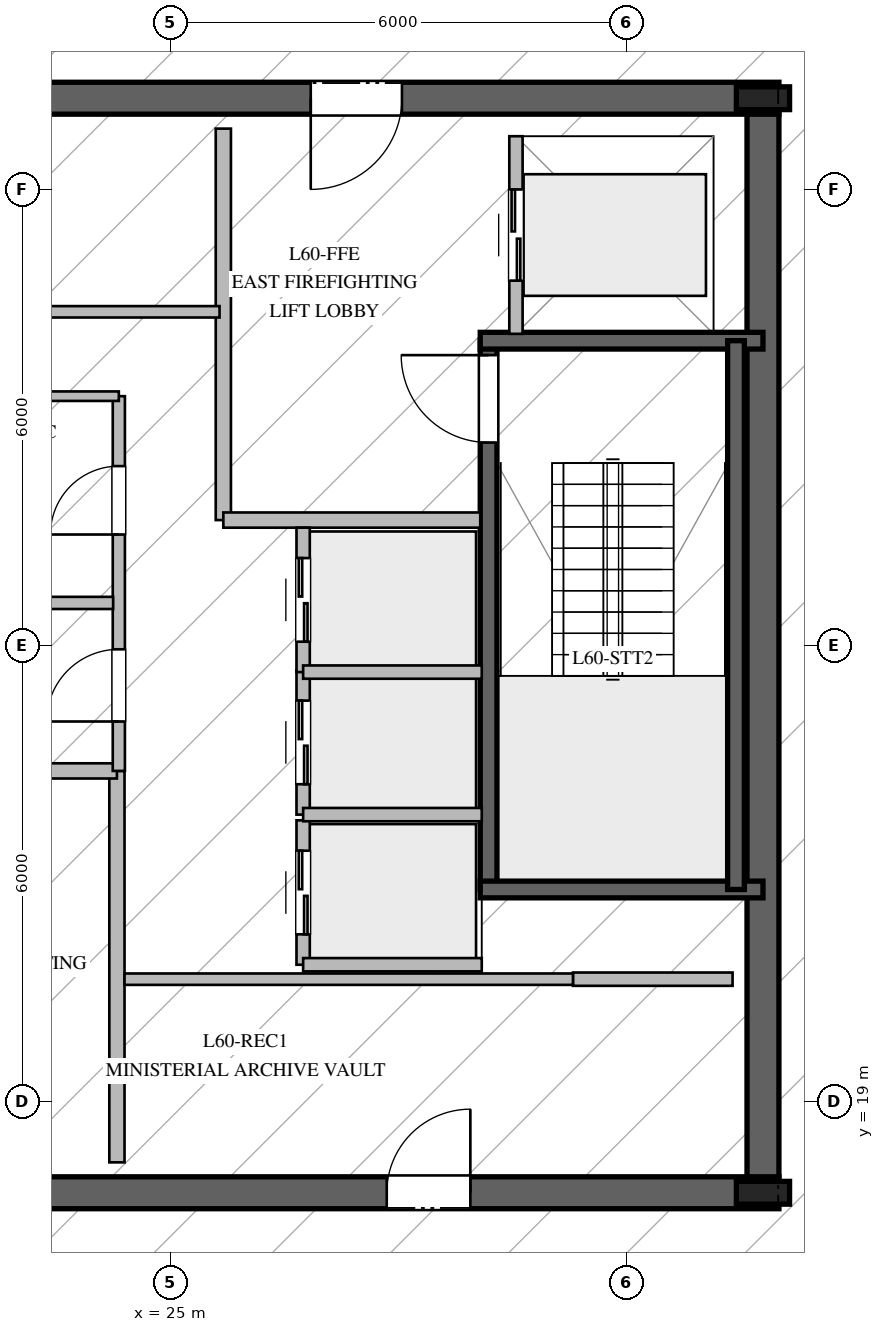
"""IFC4 building model, lengths in metres.
Left out: names, types, materials, properties, quantities, classifications, styles, units other than length and angle.
Written with IfcOpenShell. Run it as: python <this file> out.ifc"""

import sys

from ifc_helpers import new_model, si_unit, direction, frame, frame_2d, origin, origin_2d, place, context, subcontext, project, spatial, rectangle, i_section, extrude, element, fill, save


model = new_model("IFC4")
c1 = context("Model", 3, precision=1e-05, world=origin(), true_north=direction((0.0, 1.0)))
c2 = subcontext(c1, "Body", "Model", "MODEL_VIEW")
j1 = project(units=[si_unit("LENGTHUNIT", "METRE"), si_unit("PLANEANGLEUNIT", "RADIAN")], contexts=[c1])
p1 = place(None, origin())
s1 = spatial("IfcSite", under=j1, at=p1, CompositionType="ELEMENT")
p2 = place(p1, origin())
s2 = spatial("IfcBuilding", under=s1, at=p2, CompositionType="ELEMENT")
p3 = place(p2, frame((0.0, 0.0, 250.2)))
s3 = spatial("IfcBuildingStorey", under=s2, at=p3, CompositionType="ELEMENT", Elevation=250.2)
p4 = place(p3, frame((16.99, 17.8, 0.0), z_axis=(0.0, 0.0, 1.0), x_axis=(1.0, 0.0, 0.0)))
e1 = element("IfcWall", 1, at=p4, inside=s3, PredefinedType="SHEAR", context=c2, shape_type="SweptSolid", body=[
    extrude(rectangle(XDim=16.02, YDim=0.42, at=frame_2d((8.01, 0.0))), origin(), (0.0, 0.0, 1.0), 3.78),
])
p5 = place(p4, frame((4.96, 0.0, 0.0)))
e2 = element("IfcOpeningElement", 2, at=p5, cuts=e1, PredefinedType="OPENING", context=c2, shape_type="SweptSolid", body=[
    extrude(rectangle(XDim=1.2, YDim=2.25, at=frame_2d((0.6, 1.125))), frame((0.0, 0.22, 0.0), z_axis=(0.0, -1.0, 0.0), x_axis=(1.0, 0.0, 0.0)), (0.0, 0.0, 1.0), 0.44),
])
p6 = place(p4, frame((10.86, 0.0, 0.0)))
e3 = element("IfcOpeningElement", 3, at=p6, cuts=e1, PredefinedType="OPENING", context=c2, shape_type="SweptSolid", body=[
    extrude(rectangle(XDim=1.1, YDim=2.2, at=frame_2d((0.55, 1.1))), frame((0.0, 0.22, 0.0), z_axis=(0.0, -1.0, 0.0), x_axis=(1.0, 0.0, 0.0)), (0.0, 0.0, 1.0), 0.44),
])
p7 = place(p3, frame((33.01, 32.2, 0.0), z_axis=(0.0, 0.0, 1.0), x_axis=(-1.0, 0.0, 0.0)))
e4 = element("IfcWall", 4, at=p7, inside=s3, PredefinedType="SHEAR", context=c2, shape_type="SweptSolid", body=[
    extrude(rectangle(XDim=16.02, YDim=0.42, at=frame_2d((8.01, 0.0))), origin(), (0.0, 0.0, 1.0), 3.78),
])
p8 = place(p7, frame((4.96, 0.0, 0.0)))
e5 = element("IfcOpeningElement", 5, at=p8, cuts=e4, PredefinedType="OPENING", context=c2, shape_type="SweptSolid", body=[
    extrude(rectangle(XDim=1.2, YDim=2.25, at=frame_2d((0.6, 1.125))), frame((0.0, 0.22, 0.0), z_axis=(0.0, -1.0, 0.0), x_axis=(1.0, 0.0, 0.0)), (0.0, 0.0, 1.0), 0.44),
])
p9 = place(p7, frame((9.785, 0.0, 0.0)))
e6 = element("IfcOpeningElement", 6, at=p9, cuts=e4, PredefinedType="OPENING", context=c2, shape_type="SweptSolid", body=[
    extrude(rectangle(XDim=1.1, YDim=2.2, at=frame_2d((0.55, 1.1))), frame((0.0, 0.22, 0.0), z_axis=(0.0, -1.0, 0.0), x_axis=(1.0, 0.0, 0.0)), (0.0, 0.0, 1.0), 0.44),
])
p10 = place(p3, frame((32.8, 18.01, 0.0), z_axis=(0.0, 0.0, 1.0), x_axis=(0.0, 1.0, 0.0)))
e7 = element("IfcWall", 7, at=p10, inside=s3, PredefinedType="SHEAR", context=c2, shape_type="SweptSolid", body=[
    extrude(rectangle(XDim=13.98, YDim=0.42, at=frame_2d((6.99, 0.0))), origin(), (0.0, 0.0, 1.0), 3.78),
])
for number, where, z_axis, x_axis in (
    (8, (32.8, 17.8, 0.0), (0.0, 0.0, 1.0), (1.0, 0.0, 0.0)),
    (9, (32.8, 32.2, 0.0), (0.0, 0.0, 1.0), (1.0, 0.0, 0.0)),
):
    element("IfcColumn", number, at=place(p3, frame(where, z_axis=z_axis, x_axis=x_axis)), inside=s3, PredefinedType="COLUMN", context=c2, shape_type="SweptSolid", body=[
        extrude(i_section(OverallWidth=0.3, OverallDepth=0.7, WebThickness=0.017, FlangeThickness=0.032, at=origin_2d()), origin(), (0.0, 0.0, 1.0), 4.0),
    ])
p11 = place(p3, frame((29.19, 21.79, 0.0), z_axis=(0.0, 0.0, 1.0), x_axis=(0.0, 1.0, 0.0)))
e10 = element("IfcWall", 10, at=p11, inside=s3, PredefinedType="SOLIDWALL", context=c2, shape_type="SweptSolid", body=[
    extrude(rectangle(XDim=7.22, YDim=0.22, at=frame_2d((3.61, 0.0))), origin(), (0.0, 0.0, 1.0), 3.78),
])
p12 = place(p11, frame((5.88, 0.0, 0.0)))
e11 = element("IfcOpeningElement", 11, at=p12, cuts=e10, PredefinedType="OPENING", context=c2, shape_type="SweptSolid", body=[
    extrude(rectangle(XDim=1.15, YDim=2.2, at=frame_2d((0.575, 1.1))), frame((0.0, 0.12, 0.0), z_axis=(0.0, -1.0, 0.0), x_axis=(1.0, 0.0, 0.0)), (0.0, 0.0, 1.0), 0.24),
])
for number, where, z_axis, x_axis in (
    (12, (29.08, 21.79, 0.0), (0.0, 0.0, 1.0), (1.0, 0.0, 0.0)),
    (13, (29.08, 29.01, 0.0), (0.0, 0.0, 1.0), (1.0, 0.0, 0.0)),
):
    element("IfcWall", number, at=place(p3, frame(where, z_axis=z_axis, x_axis=x_axis)), inside=s3, PredefinedType="SOLIDWALL", context=c2, shape_type="SweptSolid", body=[
        extrude(rectangle(XDim=3.72, YDim=0.22, at=frame_2d((1.86, 0.0))), origin(), (0.0, 0.0, 1.0), 3.78),
    ])
p13 = place(p3, frame((32.445, 29.01, 0.0), z_axis=(0.0, 0.0, 1.0), x_axis=(0.0, -1.0, 0.0)))
e14 = element("IfcWall", 14, at=p13, inside=s3, PredefinedType="SOLIDWALL", context=c2, shape_type="SweptSolid", body=[
    extrude(rectangle(XDim=7.22, YDim=0.22, at=frame_2d((3.61, 0.0))), origin(), (0.0, 0.0, 1.0), 3.78),
])
p14 = place(p3, frame((24.3, 18.2, 0.0), z_axis=(0.0, 0.0, 1.0), x_axis=(0.0, 1.0, 0.0)))
e15 = element("IfcWall", 15, at=p14, inside=s3, PredefinedType="PARTITIONING", context=c2, shape_type="SweptSolid", body=[
    extrude(rectangle(XDim=5.15, YDim=0.2, at=frame_2d((2.575, 0.0))), origin(), (0.0, 0.0, 1.0), 3.78),
])
p15 = place(p3, frame((20.92, 23.35, 0.0), z_axis=(0.0, 0.0, 1.0), x_axis=(1.0, 0.0, 0.0)))
e16 = element("IfcWall", 16, at=p15, inside=s3, PredefinedType="PARTITIONING", context=c2, shape_type="SweptSolid", body=[
    extrude(rectangle(XDim=3.38, YDim=0.2, at=frame_2d((1.69, 0.0))), origin(), (0.0, 0.0, 1.0), 3.78),
])
p16 = place(p3, frame((25.7, 26.65, 0.0), z_axis=(0.0, 0.0, 1.0), x_axis=(0.0, 1.0, 0.0)))
e17 = element("IfcWall", 17, at=p16, inside=s3, PredefinedType="PARTITIONING", context=c2, shape_type="SweptSolid", body=[
    extrude(rectangle(XDim=5.15, YDim=0.2, at=frame_2d((2.575, 0.0))), origin(), (0.0, 0.0, 1.0), 3.78),
])
p17 = place(p3, frame((25.7, 26.65, 0.0), z_axis=(0.0, 0.0, 1.0), x_axis=(1.0, 0.0, 0.0)))
e18 = element("IfcWall", 18, at=p17, inside=s3, PredefinedType="PARTITIONING", context=c2, shape_type="SweptSolid", body=[
    extrude(rectangle(XDim=3.38, YDim=0.2, at=frame_2d((1.69, 0.0))), origin(), (0.0, 0.0, 1.0), 3.78),
])
p18 = place(p3, frame((24.325, 23.35, 0.0), z_axis=(0.0, 0.0, 1.0), x_axis=(0.0, 1.0, 0.0)))
e19 = element("IfcWall", 19, at=p18, inside=s3, PredefinedType="PLUMBINGWALL", context=c2, shape_type="SweptSolid", body=[
    extrude(rectangle(XDim=4.93, YDim=0.16, at=frame_2d((2.465, 0.0))), origin(), (0.0, 0.0, 1.0), 3.78),
])
p19 = place(p18, frame((0.65, 0.0, 0.0)))
e20 = element("IfcOpeningElement", 20, at=p19, cuts=e19, PredefinedType="OPENING", context=c2, shape_type="SweptSolid", body=[
    extrude(rectangle(XDim=0.95, YDim=2.1, at=frame_2d((0.475, 1.05))), frame((0.0, 0.09, 0.0), z_axis=(0.0, -1.0, 0.0), x_axis=(1.0, 0.0, 0.0)), (0.0, 0.0, 1.0), 0.18),
])
p20 = place(p18, frame((3.11, 0.0, 0.0)))
e21 = element("IfcOpeningElement", 21, at=p20, cuts=e19, PredefinedType="OPENING", context=c2, shape_type="SweptSolid", body=[
    extrude(rectangle(XDim=0.9, YDim=2.1, at=frame_2d((0.45, 1.05))), frame((0.0, 0.09, 0.0), z_axis=(0.0, -1.0, 0.0), x_axis=(1.0, 0.0, 0.0)), (0.0, 0.0, 1.0), 0.18),
])
p21 = place(p3, frame((20.92, 28.28, 0.0), z_axis=(0.0, 0.0, 1.0), x_axis=(1.0, 0.0, 0.0)))
e22 = element("IfcWall", 22, at=p21, inside=s3, PredefinedType="PARTITIONING", context=c2, shape_type="SweptSolid", body=[
    extrude(rectangle(XDim=3.405, YDim=0.125, at=frame_2d((1.703, 0.0))), origin(), (0.0, 0.0, 1.0), 3.78),
])
p22 = place(p21, frame((0.255, 0.0, 0.0)))
e23 = element("IfcOpeningElement", 23, at=p22, cuts=e22, PredefinedType="OPENING", context=c2, shape_type="SweptSolid", body=[
    extrude(rectangle(XDim=1.0, YDim=2.15, at=frame_2d((0.5, 1.075))), frame((0.0, 0.073, 0.0), z_axis=(0.0, -1.0, 0.0), x_axis=(1.0, 0.0, 0.0)), (0.0, 0.0, 1.0), 0.145),
])
p23 = place(p3, frame((20.95, 25.56, 0.0), z_axis=(0.0, 0.0, 1.0), x_axis=(1.0, 0.0, 0.0)))
e24 = element("IfcWall", 24, at=p23, inside=s3, PredefinedType="PLUMBINGWALL", context=c2, shape_type="SweptSolid", body=[
    extrude(rectangle(XDim=3.3, YDim=0.16, at=frame_2d((1.65, 0.0))), origin(), (0.0, 0.0, 1.0), 3.78),
])
p24 = place(p3, frame((30.3, 20.61, 0.0), z_axis=(0.0, 0.0, 1.0), x_axis=(1.0, 0.0, 0.0)))
e25 = element("IfcWall", 25, at=p24, inside=s3, PredefinedType="PARTITIONING", context=c2, shape_type="SweptSolid", body=[
    extrude(rectangle(XDim=2.1, YDim=0.175, at=frame_2d((1.05, 0.0))), origin(), (0.0, 0.0, 1.0), 3.78),
])
p25 = place(p3, frame((24.4, 20.61, 0.0), z_axis=(0.0, 0.0, 1.0), x_axis=(1.0, 0.0, 0.0)))
e26 = element("IfcWall", 26, at=p25, inside=s3, PredefinedType="PARTITIONING", context=c2, shape_type="SweptSolid", body=[
    extrude(rectangle(XDim=5.9, YDim=0.15, at=frame_2d((2.95, 0.0))), origin(), (0.0, 0.0, 1.0), 3.78),
])
p26 = place(p3, frame((19.75, 29.39, 0.0), z_axis=(0.0, 0.0, 1.0), x_axis=(1.0, 0.0, 0.0)))
e27 = element("IfcWall", 27, at=p26, inside=s3, PredefinedType="PARTITIONING", context=c2, shape_type="SweptSolid", body=[
    extrude(rectangle(XDim=5.9, YDim=0.15, at=frame_2d((2.95, 0.0))), origin(), (0.0, 0.0, 1.0), 3.78),
])
p27 = place(p3, frame((26.75, 20.8, 0.0), z_axis=(0.0, 0.0, 1.0), x_axis=(0.0, 1.0, 0.0)))
e28 = element("IfcWall", 28, at=p27, inside=s3, PredefinedType="PARTITIONING", context=c2, shape_type="SweptSolid", body=[
    extrude(rectangle(XDim=1.9, YDim=0.175, at=frame_2d((0.95, 0.0))), origin(), (0.0, 0.0, 1.0), 3.78),
])
p28 = place(p27, frame((0.4, 0.0, 0.0)))
e29 = element("IfcOpeningElement", 29, at=p28, cuts=e28, PredefinedType="OPENING", context=c2, shape_type="SweptSolid", body=[
    extrude(rectangle(XDim=1.1, YDim=2.2, at=frame_2d((0.55, 1.1))), frame((0.0, 0.098, 0.0), z_axis=(0.0, -1.0, 0.0), x_axis=(1.0, 0.0, 0.0)), (0.0, 0.0, 1.0), 0.195),
])
p29 = place(p3, frame((26.75, 20.8, 0.0), z_axis=(0.0, 0.0, 1.0), x_axis=(1.0, 0.0, 0.0)))
e30 = element("IfcWall", 30, at=p29, inside=s3, PredefinedType="PARTITIONING", context=c2, shape_type="SweptSolid", body=[
    extrude(rectangle(XDim=2.35, YDim=0.175, at=frame_2d((1.175, 0.0))), origin(), (0.0, 0.0, 1.0), 3.78),
])
p30 = place(p3, frame((26.75, 22.775, 0.0), z_axis=(0.0, 0.0, 1.0), x_axis=(0.0, 1.0, 0.0)))
e31 = element("IfcWall", 31, at=p30, inside=s3, PredefinedType="PARTITIONING", context=c2, shape_type="SweptSolid", body=[
    extrude(rectangle(XDim=1.9, YDim=0.175, at=frame_2d((0.95, 0.0))), origin(), (0.0, 0.0, 1.0), 3.78),
])
p31 = place(p30, frame((0.4, 0.0, 0.0)))
e32 = element("IfcOpeningElement", 32, at=p31, cuts=e31, PredefinedType="OPENING", context=c2, shape_type="SweptSolid", body=[
    extrude(rectangle(XDim=1.1, YDim=2.2, at=frame_2d((0.55, 1.1))), frame((0.0, 0.098, 0.0), z_axis=(0.0, -1.0, 0.0), x_axis=(1.0, 0.0, 0.0)), (0.0, 0.0, 1.0), 0.195),
])
p32 = place(p3, frame((26.75, 22.775, 0.0), z_axis=(0.0, 0.0, 1.0), x_axis=(1.0, 0.0, 0.0)))
e33 = element("IfcWall", 33, at=p32, inside=s3, PredefinedType="PARTITIONING", context=c2, shape_type="SweptSolid", body=[
    extrude(rectangle(XDim=2.35, YDim=0.175, at=frame_2d((1.175, 0.0))), origin(), (0.0, 0.0, 1.0), 3.78),
])
p33 = place(p3, frame((26.75, 24.65, 0.0), z_axis=(0.0, 0.0, 1.0), x_axis=(0.0, 1.0, 0.0)))
e34 = element("IfcWall", 34, at=p33, inside=s3, PredefinedType="PARTITIONING", context=c2, shape_type="SweptSolid", body=[
    extrude(rectangle(XDim=1.9, YDim=0.175, at=frame_2d((0.95, 0.0))), origin(), (0.0, 0.0, 1.0), 3.78),
])
p34 = place(p33, frame((0.4, 0.0, 0.0)))
e35 = element("IfcOpeningElement", 35, at=p34, cuts=e34, PredefinedType="OPENING", context=c2, shape_type="SweptSolid", body=[
    extrude(rectangle(XDim=1.1, YDim=2.2, at=frame_2d((0.55, 1.1))), frame((0.0, 0.098, 0.0), z_axis=(0.0, -1.0, 0.0), x_axis=(1.0, 0.0, 0.0)), (0.0, 0.0, 1.0), 0.195),
])
p35 = place(p3, frame((26.75, 24.65, 0.0), z_axis=(0.0, 0.0, 1.0), x_axis=(1.0, 0.0, 0.0)))
e36 = element("IfcWall", 36, at=p35, inside=s3, PredefinedType="PARTITIONING", context=c2, shape_type="SweptSolid", body=[
    extrude(rectangle(XDim=2.35, YDim=0.175, at=frame_2d((1.175, 0.0))), origin(), (0.0, 0.0, 1.0), 3.78),
])
p36 = place(p3, frame((29.55, 29.1, 0.0), z_axis=(0.0, 0.0, 1.0), x_axis=(0.0, 1.0, 0.0)))
e37 = element("IfcWall", 37, at=p36, inside=s3, PredefinedType="PARTITIONING", context=c2, shape_type="SweptSolid", body=[
    extrude(rectangle(XDim=2.6, YDim=0.175, at=frame_2d((1.3, 0.0))), origin(), (0.0, 0.0, 1.0), 3.78),
])
p37 = place(p36, frame((0.7, 0.0, 0.0)))
e38 = element("IfcOpeningElement", 38, at=p37, cuts=e37, PredefinedType="OPENING", context=c2, shape_type="SweptSolid", body=[
    extrude(rectangle(XDim=1.2, YDim=2.2, at=frame_2d((0.6, 1.1))), frame((0.0, 0.098, 0.0), z_axis=(0.0, -1.0, 0.0), x_axis=(1.0, 0.0, 0.0)), (0.0, 0.0, 1.0), 0.195),
])
p38 = place(p12, origin())
e39 = element("IfcDoor", 39, at=p38, inside=s3, OperationType="SINGLE_SWING_RIGHT", PredefinedType="DOOR", context=c2, shape_type="SweptSolid", body=[
    extrude(rectangle(XDim=1.15, YDim=2.2, at=frame_2d((0.575, 1.1))), frame((0.0, 0.025, 0.0), z_axis=(0.0, -1.0, 0.0), x_axis=(1.0, 0.0, 0.0)), (0.0, 0.0, 1.0), 0.05),
])
fill(e11, e39)
p39 = place(p8, origin())
e40 = element("IfcDoor", 40, at=p39, inside=s3, OperationType="SINGLE_SWING_RIGHT", PredefinedType="DOOR", context=c2, shape_type="SweptSolid", body=[
    extrude(rectangle(XDim=1.2, YDim=2.25, at=frame_2d((0.6, 1.125))), frame((0.0, 0.025, 0.0), z_axis=(0.0, -1.0, 0.0), x_axis=(1.0, 0.0, 0.0)), (0.0, 0.0, 1.0), 0.05),
])
fill(e5, e40)
p40 = place(p19, origin())
e41 = element("IfcDoor", 41, at=p40, inside=s3, OperationType="SINGLE_SWING_LEFT", PredefinedType="DOOR", context=c2, shape_type="SweptSolid", body=[
    extrude(rectangle(XDim=0.95, YDim=2.1, at=frame_2d((0.475, 1.05))), frame((0.0, 0.025, 0.0), z_axis=(0.0, -1.0, 0.0), x_axis=(1.0, 0.0, 0.0)), (0.0, 0.0, 1.0), 0.05),
])
fill(e20, e41)
p41 = place(p20, origin())
e42 = element("IfcDoor", 42, at=p41, inside=s3, OperationType="SINGLE_SWING_LEFT", PredefinedType="DOOR", context=c2, shape_type="SweptSolid", body=[
    extrude(rectangle(XDim=0.9, YDim=2.1, at=frame_2d((0.45, 1.05))), frame((0.0, 0.025, 0.0), z_axis=(0.0, -1.0, 0.0), x_axis=(1.0, 0.0, 0.0)), (0.0, 0.0, 1.0), 0.05),
])
fill(e21, e42)
p42 = place(p6, origin())
e43 = element("IfcDoor", 43, at=p42, inside=s3, OperationType="SINGLE_SWING_RIGHT", PredefinedType="DOOR", context=c2, shape_type="SweptSolid", body=[
    extrude(rectangle(XDim=1.1, YDim=2.2, at=frame_2d((0.55, 1.1))), frame((0.0, 0.025, 0.0), z_axis=(0.0, -1.0, 0.0), x_axis=(1.0, 0.0, 0.0)), (0.0, 0.0, 1.0), 0.05),
])
fill(e3, e43)
p43 = place(p28, origin())
e44 = element("IfcDoor", 44, at=p43, inside=s3, OperationType="DOUBLE_DOOR_SLIDING", PredefinedType="DOOR", context=c2, shape_type="SweptSolid", body=[
    extrude(rectangle(XDim=1.1, YDim=2.2, at=frame_2d((0.55, 1.1))), frame((0.0, 0.025, 0.0), z_axis=(0.0, -1.0, 0.0), x_axis=(1.0, 0.0, 0.0)), (0.0, 0.0, 1.0), 0.05),
])
fill(e29, e44)
p44 = place(p31, origin())
e45 = element("IfcDoor", 45, at=p44, inside=s3, OperationType="DOUBLE_DOOR_SLIDING", PredefinedType="DOOR", context=c2, shape_type="SweptSolid", body=[
    extrude(rectangle(XDim=1.1, YDim=2.2, at=frame_2d((0.55, 1.1))), frame((0.0, 0.025, 0.0), z_axis=(0.0, -1.0, 0.0), x_axis=(1.0, 0.0, 0.0)), (0.0, 0.0, 1.0), 0.05),
])
fill(e32, e45)
p45 = place(p34, origin())
e46 = element("IfcDoor", 46, at=p45, inside=s3, OperationType="DOUBLE_DOOR_SLIDING", PredefinedType="DOOR", context=c2, shape_type="SweptSolid", body=[
    extrude(rectangle(XDim=1.1, YDim=2.2, at=frame_2d((0.55, 1.1))), frame((0.0, 0.025, 0.0), z_axis=(0.0, -1.0, 0.0), x_axis=(1.0, 0.0, 0.0)), (0.0, 0.0, 1.0), 0.05),
])
fill(e35, e46)
p46 = place(p37, origin())
e47 = element("IfcDoor", 47, at=p46, inside=s3, OperationType="DOUBLE_DOOR_SLIDING", PredefinedType="DOOR", context=c2, shape_type="SweptSolid", body=[
    extrude(rectangle(XDim=1.2, YDim=2.2, at=frame_2d((0.6, 1.1))), frame((0.0, 0.025, 0.0), z_axis=(0.0, -1.0, 0.0), x_axis=(1.0, 0.0, 0.0)), (0.0, 0.0, 1.0), 0.05),
])
fill(e38, e47)
save(model, sys.argv[1])
